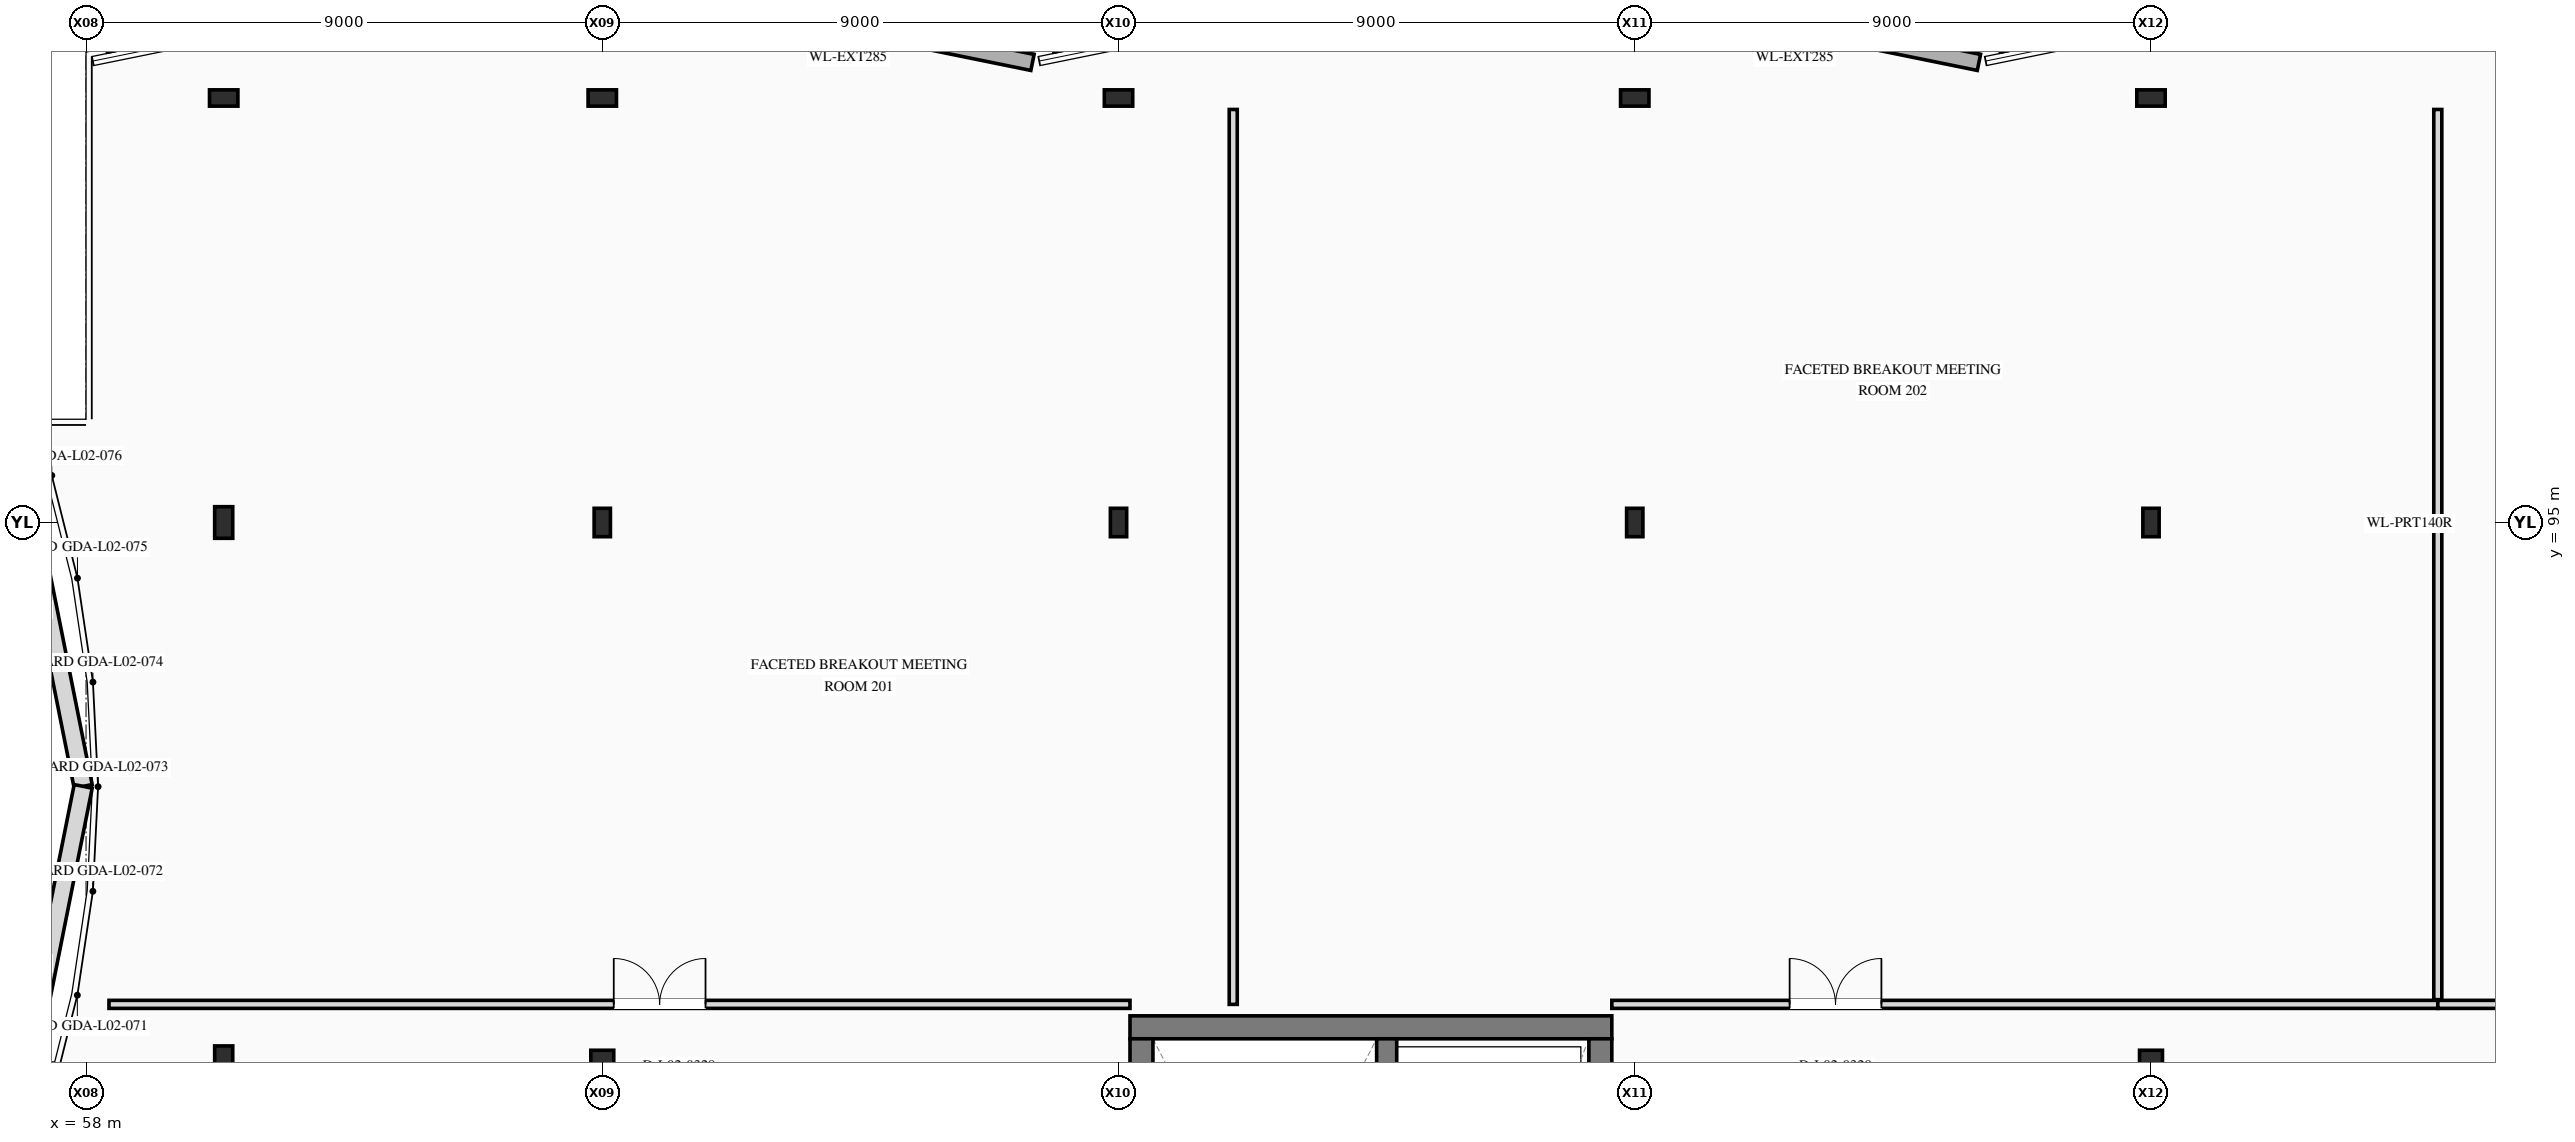
"""IFC4 building model, lengths in metres.
Left out: names, types, materials, properties, quantities, classifications, styles, units other than length and angle.
Written with IfcOpenShell. Run it as: python <this file> out.ifc"""

import sys

from ifc_helpers import new_model, si_unit, direction, frame, frame_2d, origin, origin_2d, place, context, subcontext, project, spatial, rectangle, hollow_rectangle, i_section, extrude, element, fill, save


model = new_model("IFC4")
c1 = context("Model", 3, precision=1e-05, world=origin(), true_north=direction((0.0, 1.0)))
c2 = subcontext(c1, "Body", "Model", "MODEL_VIEW")
j1 = project(units=[si_unit("LENGTHUNIT", "METRE"), si_unit("PLANEANGLEUNIT", "RADIAN")], contexts=[c1])
p1 = place(None, origin())
s1 = spatial("IfcSite", under=j1, at=p1, CompositionType="ELEMENT")
p2 = place(p1, origin())
s2 = spatial("IfcBuilding", under=s1, at=p2, CompositionType="ELEMENT")
p3 = place(p2, frame((0.0, 0.0, 10.8)))
s3 = spatial("IfcBuildingStorey", under=s2, at=p3, CompositionType="ELEMENT", Elevation=10.8)
p4 = place(p3, frame((67.0, 85.6, 0.0), z_axis=(0.0, 0.0, 1.0), x_axis=(1.0, 0.0, 0.0)))
e1 = element("IfcColumn", 1, at=p4, inside=s3, PredefinedType="COLUMN", context=c2, shape_type="SweptSolid", body=[
    extrude(hollow_rectangle(XDim=0.4, YDim=0.4, WallThickness=0.016, at=origin_2d()), origin(), (0.0, 0.0, 1.0), 4.8),
])
for number, where, z_axis, x_axis in (
    (2, (67.0, 95.0, 0.0), (0.0, 0.0, 1.0), (1.0, 0.0, 0.0)),
    (3, (76.0, 95.0, 0.0), (0.0, 0.0, 1.0), (1.0, 0.0, 0.0)),
    (4, (85.0, 95.0, 0.0), (0.0, 0.0, 1.0), (1.0, 0.0, 0.0)),
):
    element("IfcColumn", number, at=place(p3, frame(where, z_axis=z_axis, x_axis=x_axis)), inside=s3, PredefinedType="COLUMN", context=c2, shape_type="SweptSolid", body=[
        extrude(i_section(OverallWidth=0.284, OverallDepth=0.495, WebThickness=0.019, FlangeThickness=0.033, at=origin_2d()), origin(), (0.0, 0.0, 1.0), 4.8),
    ])
p5 = place(p3, frame((94.0, 85.6, 0.0), z_axis=(0.0, 0.0, 1.0), x_axis=(1.0, 0.0, 0.0)))
e5 = element("IfcColumn", 5, at=p5, inside=s3, PredefinedType="COLUMN", context=c2, shape_type="SweptSolid", body=[
    extrude(hollow_rectangle(XDim=0.4, YDim=0.4, WallThickness=0.016, at=origin_2d()), origin(), (0.0, 0.0, 1.0), 4.8),
])
p6 = place(p3, frame((94.0, 95.0, 0.0), z_axis=(0.0, 0.0, 1.0), x_axis=(1.0, 0.0, 0.0)))
e6 = element("IfcColumn", 6, at=p6, inside=s3, PredefinedType="COLUMN", context=c2, shape_type="SweptSolid", body=[
    extrude(i_section(OverallWidth=0.284, OverallDepth=0.495, WebThickness=0.019, FlangeThickness=0.033, at=origin_2d()), origin(), (0.0, 0.0, 1.0), 4.8),
])
for number, where, z_axis, x_axis in (
    (7, (60.4, 85.6, 0.0), (0.0, 0.0, 1.0), (1.0, 0.0, 0.0)),
    (8, (60.4, 95.0, 0.0), (0.0, 0.0, 1.0), (1.0, 0.0, 0.0)),
):
    element("IfcColumn", number, at=place(p3, frame(where, z_axis=z_axis, x_axis=x_axis)), inside=s3, PredefinedType="COLUMN", context=c2, shape_type="SweptSolid", body=[
        extrude(i_section(OverallWidth=0.315, OverallDepth=0.551, WebThickness=0.015, FlangeThickness=0.024, at=origin_2d()), origin(), (0.0, 0.0, 1.0), 4.8),
    ])
for number, where, z_axis, x_axis in (
    (9, (60.4, 102.4, 0.0), (0.0, 0.0, 1.0), (0.0, 1.0, 0.0)),
    (10, (67.0, 102.4, 0.0), (0.0, 0.0, 1.0), (0.0, 1.0, 0.0)),
    (11, (76.0, 102.4, 0.0), (0.0, 0.0, 1.0), (0.0, 1.0, 0.0)),
    (12, (85.0, 102.4, 0.0), (0.0, 0.0, 1.0), (0.0, 1.0, 0.0)),
    (13, (94.0, 102.4, 0.0), (0.0, 0.0, 1.0), (0.0, 1.0, 0.0)),
):
    element("IfcColumn", number, at=place(p3, frame(where, z_axis=z_axis, x_axis=x_axis)), inside=s3, PredefinedType="COLUMN", context=c2, shape_type="SweptSolid", body=[
        extrude(i_section(OverallWidth=0.284, OverallDepth=0.495, WebThickness=0.019, FlangeThickness=0.033, at=origin_2d()), origin(), (0.0, 0.0, 1.0), 4.8),
    ])
p7 = place(p3, frame((66.25, 104.698, 0.0), z_axis=(0.0, 0.0, 1.0), x_axis=(0.979925045119, -0.199366260807, 0.0)))
e14 = element("IfcWall", 14, at=p7, inside=s3, PredefinedType="STANDARD", context=c2, shape_type="SweptSolid", body=[
    extrude(rectangle(XDim=8.419, YDim=0.285, at=frame_2d((4.209, 0.0))), origin(), (0.0, 0.0, 1.0), 4.8),
])
p8 = place(p7, frame((0.35, 0.0, 0.9)))
e15 = element("IfcOpeningElement", 15, at=p8, cuts=e14, PredefinedType="OPENING", context=c2, shape_type="SweptSolid", body=[
    extrude(rectangle(XDim=1.5, YDim=1.7, at=frame_2d((0.75, 0.85))), frame((0.0, 0.152, 0.0), z_axis=(0.0, -1.0, 0.0), x_axis=(1.0, 0.0, 0.0)), (0.0, 0.0, 1.0), 0.305),
])
p9 = place(p3, frame((82.75, 104.698, 0.0), z_axis=(0.0, 0.0, 1.0), x_axis=(0.979925045119, -0.199366260807, 0.0)))
e16 = element("IfcWall", 16, at=p9, inside=s3, PredefinedType="STANDARD", context=c2, shape_type="SweptSolid", body=[
    extrude(rectangle(XDim=8.419, YDim=0.285, at=frame_2d((4.209, 0.0))), origin(), (0.0, 0.0, 1.0), 4.8),
])
p10 = place(p9, frame((0.35, 0.0, 0.9)))
e17 = element("IfcOpeningElement", 17, at=p10, cuts=e16, PredefinedType="OPENING", context=c2, shape_type="SweptSolid", body=[
    extrude(rectangle(XDim=1.5, YDim=1.7, at=frame_2d((0.75, 0.85))), frame((0.0, 0.152, 0.0), z_axis=(0.0, -1.0, 0.0), x_axis=(1.0, 0.0, 0.0)), (0.0, 0.0, 1.0), 0.305),
])
p11 = place(p3, frame((99.25, 104.698, 0.0), z_axis=(0.0, 0.0, 1.0), x_axis=(0.979925045119, -0.199366260807, 0.0)))
e18 = element("IfcWall", 18, at=p11, inside=s3, PredefinedType="STANDARD", context=c2, shape_type="SweptSolid", body=[
    extrude(rectangle(XDim=8.419, YDim=0.285, at=frame_2d((4.209, 0.0))), origin(), (0.0, 0.0, 1.0), 4.8),
])
p12 = place(p11, frame((0.35, 0.0, 0.9)))
e19 = element("IfcOpeningElement", 19, at=p12, cuts=e18, PredefinedType="OPENING", context=c2, shape_type="SweptSolid", body=[
    extrude(rectangle(XDim=1.5, YDim=1.7, at=frame_2d((0.75, 0.85))), frame((0.0, 0.152, 0.0), z_axis=(0.0, -1.0, 0.0), x_axis=(1.0, 0.0, 0.0)), (0.0, 0.0, 1.0), 0.305),
])
p13 = place(p3, frame((84.6, 86.2, 0.0), z_axis=(0.0, 0.0, 1.0), x_axis=(-1.0, 0.0, 0.0)))
e20 = element("IfcWall", 20, at=p13, inside=s3, PredefinedType="SHEAR", context=c2, shape_type="SweptSolid", body=[
    extrude(rectangle(XDim=8.4, YDim=0.4, at=frame_2d((4.2, 0.0))), origin(), (0.0, 0.0, 1.0), 4.8),
])
p14 = place(p3, frame((76.4, 86.0, 0.0), z_axis=(0.0, 0.0, 1.0), x_axis=(0.0, -1.0, 0.0)))
e21 = element("IfcWall", 21, at=p14, inside=s3, PredefinedType="SHEAR", context=c2, shape_type="SweptSolid", body=[
    extrude(rectangle(XDim=9.4, YDim=0.4, at=frame_2d((4.7, 0.0))), origin(), (0.0, 0.0, 1.0), 4.8),
])
p15 = place(p3, frame((84.4, 76.6, 0.0), z_axis=(0.0, 0.0, 1.0), x_axis=(0.0, 1.0, 0.0)))
e22 = element("IfcWall", 22, at=p15, inside=s3, PredefinedType="SHEAR", context=c2, shape_type="SweptSolid", body=[
    extrude(rectangle(XDim=9.4, YDim=0.4, at=frame_2d((4.7, 0.0))), origin(), (0.0, 0.0, 1.0), 4.8),
])
p16 = place(p15, frame((2.05, 0.0, 0.0)))
e23 = element("IfcOpeningElement", 23, at=p16, cuts=e22, PredefinedType="OPENING", context=c2, shape_type="SweptSolid", body=[
    extrude(rectangle(XDim=1.1, YDim=2.2, at=frame_2d((0.55, 1.1))), frame((0.0, 0.21, 0.0), z_axis=(0.0, -1.0, 0.0), x_axis=(1.0, 0.0, 0.0)), (0.0, 0.0, 1.0), 0.42),
])
p17 = place(p15, frame((5.65, 0.0, 0.0)))
e24 = element("IfcOpeningElement", 24, at=p17, cuts=e22, PredefinedType="OPENING", context=c2, shape_type="SweptSolid", body=[
    extrude(rectangle(XDim=1.1, YDim=2.2, at=frame_2d((0.55, 1.1))), frame((0.0, 0.21, 0.0), z_axis=(0.0, -1.0, 0.0), x_axis=(1.0, 0.0, 0.0)), (0.0, 0.0, 1.0), 0.42),
])
p18 = place(p3, frame((80.675, 76.6, 0.0), z_axis=(0.0, 0.0, 1.0), x_axis=(0.0, 1.0, 0.0)))
e25 = element("IfcWall", 25, at=p18, inside=s3, PredefinedType="SHEAR", context=c2, shape_type="SweptSolid", body=[
    extrude(rectangle(XDim=9.4, YDim=0.35, at=frame_2d((4.7, 0.0))), origin(), (0.0, 0.0, 1.0), 4.8),
])
p19 = place(p3, frame((57.95, 90.4, 0.0), z_axis=(0.0, 0.0, 1.0), x_axis=(-0.195895407339, 0.980624795415, 0.0)))
e26 = element("IfcWall", 26, at=p19, inside=s3, PredefinedType="PARTITIONING", context=c2, shape_type="SweptSolid", body=[
    extrude(rectangle(XDim=7.232, YDim=0.32, at=frame_2d((3.616, 0.0))), origin(), (0.0, 0.0, 1.0), 4.475),
])
p20 = place(p3, frame((56.533, 83.308, 0.0), z_axis=(0.0, 0.0, 1.0), x_axis=(0.195901892383, 0.980623499902, 0.0)))
e27 = element("IfcWall", 27, at=p20, inside=s3, PredefinedType="PARTITIONING", context=c2, shape_type="SweptSolid", body=[
    extrude(rectangle(XDim=7.232, YDim=0.32, at=frame_2d((3.616, 0.0))), origin(), (0.0, 0.0, 1.0), 4.475),
])
p21 = place(p3, frame((58.4, 86.6, 0.0), z_axis=(0.0, 0.0, 1.0), x_axis=(1.0, 0.0, 0.0)))
e28 = element("IfcWall", 28, at=p21, inside=s3, PredefinedType="PARTITIONING", context=c2, shape_type="SweptSolid", body=[
    extrude(rectangle(XDim=17.8, YDim=0.14, at=frame_2d((8.9, 0.0))), origin(), (0.0, 0.0, 1.0), 3.949),
])
p22 = place(p21, frame((8.8, 0.0, 0.0)))
e29 = element("IfcOpeningElement", 29, at=p22, cuts=e28, PredefinedType="OPENING", context=c2, shape_type="SweptSolid", body=[
    extrude(rectangle(XDim=1.6, YDim=2.4, at=frame_2d((0.8, 1.2))), frame((0.0, 0.08, 0.0), z_axis=(0.0, -1.0, 0.0), x_axis=(1.0, 0.0, 0.0)), (0.0, 0.0, 1.0), 0.16),
])
p23 = place(p3, frame((84.6, 86.6, 0.0), z_axis=(0.0, 0.0, 1.0), x_axis=(1.0, 0.0, 0.0)))
e30 = element("IfcWall", 30, at=p23, inside=s3, PredefinedType="PARTITIONING", context=c2, shape_type="SweptSolid", body=[
    extrude(rectangle(XDim=14.4, YDim=0.14, at=frame_2d((7.2, 0.0))), origin(), (0.0, 0.0, 1.0), 3.949),
])
p24 = place(p23, frame((3.1, 0.0, 0.0)))
e31 = element("IfcOpeningElement", 31, at=p24, cuts=e30, PredefinedType="OPENING", context=c2, shape_type="SweptSolid", body=[
    extrude(rectangle(XDim=1.6, YDim=2.4, at=frame_2d((0.8, 1.2))), frame((0.0, 0.08, 0.0), z_axis=(0.0, -1.0, 0.0), x_axis=(1.0, 0.0, 0.0)), (0.0, 0.0, 1.0), 0.16),
])
p25 = place(p3, frame((99.0, 86.6, 0.0), z_axis=(0.0, 0.0, 1.0), x_axis=(1.0, 0.0, 0.0)))
e32 = element("IfcWall", 32, at=p25, inside=s3, PredefinedType="PARTITIONING", context=c2, shape_type="SweptSolid", body=[
    extrude(rectangle(XDim=24.6, YDim=0.14, at=frame_2d((12.3, 0.0))), origin(), (0.0, 0.0, 1.0), 3.949),
])
p26 = place(p25, frame((10.2, 0.0, 0.0)))
e33 = element("IfcOpeningElement", 33, at=p26, cuts=e32, PredefinedType="OPENING", context=c2, shape_type="SweptSolid", body=[
    extrude(rectangle(XDim=1.6, YDim=2.4, at=frame_2d((0.8, 1.2))), frame((0.0, 0.08, 0.0), z_axis=(0.0, -1.0, 0.0), x_axis=(1.0, 0.0, 0.0)), (0.0, 0.0, 1.0), 0.16),
])
p27 = place(p3, frame((78.0, 86.6, 0.0), z_axis=(0.0, 0.0, 1.0), x_axis=(0.0, 1.0, 0.0)))
e34 = element("IfcWall", 34, at=p27, inside=s3, PredefinedType="PARTITIONING", context=c2, shape_type="SweptSolid", body=[
    extrude(rectangle(XDim=15.6, YDim=0.14, at=frame_2d((7.8, 0.0))), origin(), (0.0, 0.0, 1.0), 3.888),
])
p28 = place(p3, frame((99.0, 86.682, 0.0), z_axis=(0.0, 0.0, 1.0), x_axis=(0.0, 1.0, 0.0)))
e35 = element("IfcWall", 35, at=p28, inside=s3, PredefinedType="PARTITIONING", context=c2, shape_type="SweptSolid", body=[
    extrude(rectangle(XDim=15.518, YDim=0.14, at=frame_2d((7.759, 0.0))), origin(), (0.0, 0.0, 1.0), 3.888),
])
p29 = place(p22, origin())
e36 = element("IfcDoor", 36, at=p29, inside=s3, OperationType="DOUBLE_DOOR_SINGLE_SWING", PredefinedType="DOOR", context=c2, shape_type="SweptSolid", body=[
    extrude(rectangle(XDim=1.6, YDim=2.4, at=frame_2d((0.8, 1.2))), frame((0.0, 0.025, 0.0), z_axis=(0.0, -1.0, 0.0), x_axis=(1.0, 0.0, 0.0)), (0.0, 0.0, 1.0), 0.05),
])
fill(e29, e36)
p30 = place(p24, origin())
e37 = element("IfcDoor", 37, at=p30, inside=s3, OperationType="DOUBLE_DOOR_SINGLE_SWING", PredefinedType="DOOR", context=c2, shape_type="SweptSolid", body=[
    extrude(rectangle(XDim=1.6, YDim=2.4, at=frame_2d((0.8, 1.2))), frame((0.0, 0.025, 0.0), z_axis=(0.0, -1.0, 0.0), x_axis=(1.0, 0.0, 0.0)), (0.0, 0.0, 1.0), 0.05),
])
fill(e31, e37)
save(model, sys.argv[1])
